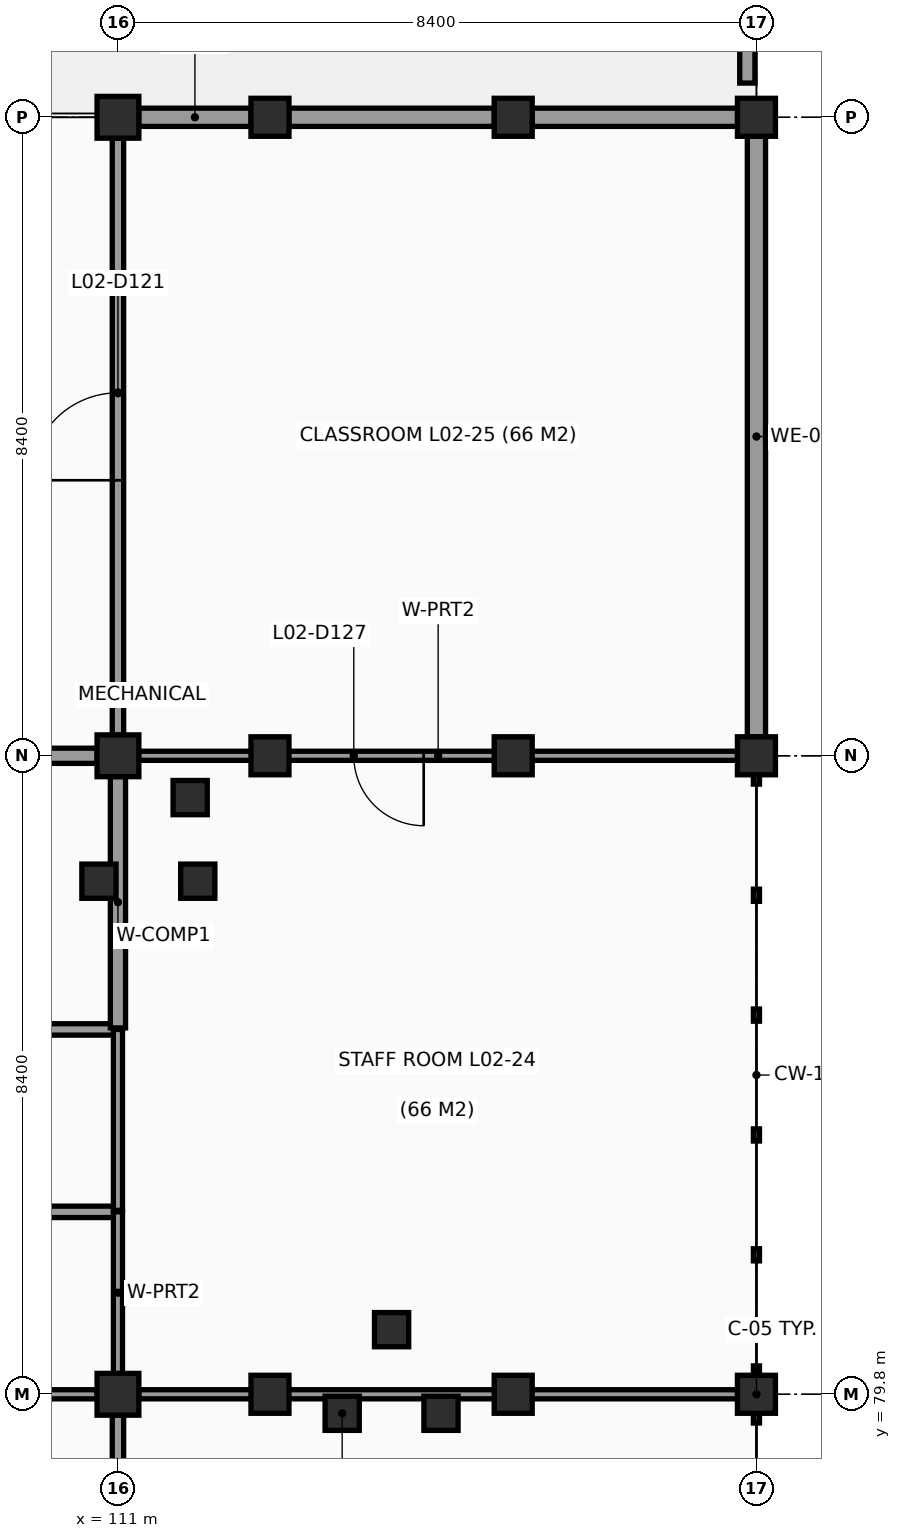
"""IFC4 building model, lengths in metres.
Left out: names, types, materials, properties, quantities, classifications, styles, units other than length and angle.
Written with IfcOpenShell. Run it as: python <this file> out.ifc"""

import sys

from ifc_helpers import new_model, si_unit, direction, frame, frame_2d, origin, origin_2d, place, context, subcontext, project, spatial, rectangle, extrude, element, fill, save


model = new_model("IFC4")
c1 = context("Model", 3, precision=1e-05, world=origin(), true_north=direction((0.0, 1.0)))
c2 = subcontext(c1, "Body", "Model", "MODEL_VIEW")
j1 = project(units=[si_unit("LENGTHUNIT", "METRE"), si_unit("PLANEANGLEUNIT", "RADIAN")], contexts=[c1])
p1 = place(None, origin())
s1 = spatial("IfcSite", under=j1, at=p1, CompositionType="ELEMENT")
p2 = place(p1, origin())
s2 = spatial("IfcBuilding", under=s1, at=p2, CompositionType="ELEMENT")
p3 = place(p2, frame((0.0, 0.0, 7.8)))
s3 = spatial("IfcBuildingStorey", under=s2, at=p3, CompositionType="ELEMENT", Elevation=7.8)
for number, where, z_axis, x_axis in (
    (1, (111.0, 79.8, 0.0), (0.0, 0.0, 1.0), (1.0, 0.0, 0.0)),
    (2, (111.0, 88.2, 0.0), (0.0, 0.0, 1.0), (1.0, 0.0, 0.0)),
    (3, (111.0, 96.6, 0.0), (0.0, 0.0, 1.0), (1.0, 0.0, 0.0)),
):
    element("IfcColumn", number, at=place(p3, frame(where, z_axis=z_axis, x_axis=x_axis)), inside=s3, PredefinedType="COLUMN", context=c2, shape_type="SweptSolid", body=[
        extrude(rectangle(XDim=0.55, YDim=0.55, at=origin_2d()), origin(), (0.0, 0.0, 1.0), 3.6),
    ])
for number, where, z_axis, x_axis in (
    (4, (119.4, 79.8, 0.0), (0.0, 0.0, 1.0), (1.0, 0.0, 0.0)),
    (5, (119.4, 88.2, 0.0), (0.0, 0.0, 1.0), (1.0, 0.0, 0.0)),
    (6, (119.4, 96.6, 0.0), (0.0, 0.0, 1.0), (1.0, 0.0, 0.0)),
):
    element("IfcColumn", number, at=place(p3, frame(where, z_axis=z_axis, x_axis=x_axis)), inside=s3, PredefinedType="COLUMN", context=c2, shape_type="SweptSolid", body=[
        extrude(rectangle(XDim=0.5, YDim=0.5, at=origin_2d()), origin(), (0.0, 0.0, 1.0), 3.34),
    ])
for number, where, z_axis, x_axis in (
    (7, (116.2, 79.8, 0.0), (0.0, 0.0, 1.0), (1.0, 0.0, 0.0)),
    (8, (116.2, 88.2, 0.0), (0.0, 0.0, 1.0), (1.0, 0.0, 0.0)),
    (9, (116.2, 96.6, 0.0), (0.0, 0.0, 1.0), (1.0, 0.0, 0.0)),
    (10, (113.0, 79.8, 0.0), (0.0, 0.0, 1.0), (1.0, 0.0, 0.0)),
    (11, (113.0, 88.2, 0.0), (0.0, 0.0, 1.0), (1.0, 0.0, 0.0)),
    (12, (113.0, 96.6, 0.0), (0.0, 0.0, 1.0), (1.0, 0.0, 0.0)),
):
    element("IfcColumn", number, at=place(p3, frame(where, z_axis=z_axis, x_axis=x_axis)), inside=s3, PredefinedType="COLUMN", context=c2, shape_type="SweptSolid", body=[
        extrude(rectangle(XDim=0.5, YDim=0.5, at=origin_2d()), origin(), (0.0, 0.0, 1.0), 3.6),
    ])
for number, where, z_axis, x_axis in (
    (13, (113.95, 79.55, 0.0), (0.0, 0.0, 1.0), (1.0, 0.0, 0.0)),
    (14, (115.25, 79.55, 0.0), (0.0, 0.0, 1.0), (1.0, 0.0, 0.0)),
    (15, (114.6, 80.65, 0.0), (0.0, 0.0, 1.0), (1.0, 0.0, 0.0)),
    (16, (110.75, 86.55, 0.0), (0.0, 0.0, 1.0), (1.0, 0.0, 0.0)),
    (17, (112.05, 86.55, 0.0), (0.0, 0.0, 1.0), (1.0, 0.0, 0.0)),
    (18, (111.95, 87.65, 0.0), (0.0, 0.0, 1.0), (1.0, 0.0, 0.0)),
):
    element("IfcColumn", number, at=place(p3, frame(where, z_axis=z_axis, x_axis=x_axis)), inside=s3, PredefinedType="COLUMN", context=c2, shape_type="SweptSolid", body=[
        extrude(rectangle(XDim=0.45, YDim=0.45, at=origin_2d()), origin(), (0.0, 0.0, 1.0), 3.6),
    ])
p4 = place(p3, frame((111.273, 96.6, 0.0), z_axis=(0.0, 0.0, 1.0), x_axis=(1.0, 0.0, 0.0)))
e19 = element("IfcWall", 19, at=p4, inside=s3, PredefinedType="SOLIDWALL", context=c2, shape_type="SweptSolid", body=[
    extrude(rectangle(XDim=1.479, YDim=0.24, at=frame_2d((0.74, 0.0))), origin(), (0.0, 0.0, 1.0), 2.58),
])
p5 = place(p3, frame((113.248, 96.6, 0.0), z_axis=(0.0, 0.0, 1.0), x_axis=(1.0, 0.0, 0.0)))
e20 = element("IfcWall", 20, at=p5, inside=s3, PredefinedType="SOLIDWALL", context=c2, shape_type="SweptSolid", body=[
    extrude(rectangle(XDim=2.704, YDim=0.24, at=frame_2d((1.352, 0.0))), origin(), (0.0, 0.0, 1.0), 2.58),
])
p6 = place(p3, frame((116.448, 96.6, 0.0), z_axis=(0.0, 0.0, 1.0), x_axis=(1.0, 0.0, 0.0)))
e21 = element("IfcWall", 21, at=p6, inside=s3, PredefinedType="SOLIDWALL", context=c2, shape_type="SweptSolid", body=[
    extrude(rectangle(XDim=2.704, YDim=0.24, at=frame_2d((1.352, 0.0))), origin(), (0.0, 0.0, 1.0), 2.58),
])
p7 = place(p3, frame((119.4, 96.352, 0.0), z_axis=(0.0, 0.0, 1.0), x_axis=(0.0, -1.0, 0.0)))
e22 = element("IfcWall", 22, at=p7, inside=s3, PredefinedType="SOLIDWALL", context=c2, shape_type="SweptSolid", body=[
    extrude(rectangle(XDim=7.904, YDim=0.24, at=frame_2d((3.952, 0.0))), origin(), (0.0, 0.0, 1.0), 2.58),
])
p8 = place(p3, frame((119.28, 111.88, 0.0), z_axis=(0.0, 0.0, 1.0), x_axis=(0.0, -1.0, 0.0)))
e23 = element("IfcWall", 23, at=p8, inside=s3, PredefinedType="PARAPET", context=c2, shape_type="SweptSolid", body=[
    extrude(rectangle(XDim=14.83, YDim=0.2, at=frame_2d((7.415, 0.0))), origin(), (0.0, 0.0, 1.0), 1.1),
])
p9 = place(p3, frame((110.727, 79.8, 0.0), z_axis=(0.0, 0.0, 1.0), x_axis=(-1.0, 0.0, 0.0)))
e24 = element("IfcWall", 24, at=p9, inside=s3, PredefinedType="PARTITIONING", context=c2, shape_type="SweptSolid", body=[
    extrude(rectangle(XDim=3.907, YDim=0.12, at=frame_2d((1.954, 0.0))), origin(), (0.0, 0.0, 1.0), 2.95),
])
p10 = place(p9, frame((2.154, 0.0, 0.0)))
e25 = element("IfcOpeningElement", 25, at=p10, cuts=e24, PredefinedType="OPENING", context=c2, shape_type="SweptSolid", body=[
    extrude(rectangle(XDim=0.9, YDim=2.1, at=frame_2d((0.45, 1.05))), frame((0.0, 0.07, 0.0), z_axis=(0.0, -1.0, 0.0), x_axis=(1.0, 0.0, 0.0)), (0.0, 0.0, 1.0), 0.14),
])
p11 = place(p3, frame((106.82, 82.2, 0.0), z_axis=(0.0, 0.0, 1.0), x_axis=(1.0, 0.0, 0.0)))
e26 = element("IfcWall", 26, at=p11, inside=s3, PredefinedType="PARTITIONING", context=c2, shape_type="SweptSolid", body=[
    extrude(rectangle(XDim=4.18, YDim=0.15, at=frame_2d((2.09, 0.0))), origin(), (0.0, 0.0, 1.0), 2.94),
])
p12 = place(p3, frame((111.0, 82.2, 0.0), z_axis=(0.0, 0.0, 1.0), x_axis=(0.0, -1.0, 0.0)))
e27 = element("IfcWall", 27, at=p12, inside=s3, PredefinedType="PARTITIONING", context=c2, shape_type="SweptSolid", body=[
    extrude(rectangle(XDim=2.127, YDim=0.12, at=frame_2d((1.063, 0.0))), origin(), (0.0, 0.0, 1.0), 2.94),
])
p13 = place(p3, frame((106.8, 84.6, 0.0), z_axis=(0.0, 0.0, 1.0), x_axis=(1.0, 0.0, 0.0)))
e28 = element("IfcWall", 28, at=p13, inside=s3, PredefinedType="PARTITIONING", context=c2, shape_type="SweptSolid", body=[
    extrude(rectangle(XDim=4.2, YDim=0.15, at=frame_2d((2.1, 0.0))), origin(), (0.0, 0.0, 1.0), 2.94),
])
p14 = place(p13, frame((1.5, 0.0, 0.0)))
e29 = element("IfcOpeningElement", 29, at=p14, cuts=e28, PredefinedType="OPENING", context=c2, shape_type="SweptSolid", body=[
    extrude(rectangle(XDim=1.2, YDim=2.15, at=frame_2d((0.6, 1.075))), frame((0.0, 0.085, 0.0), z_axis=(0.0, -1.0, 0.0), x_axis=(1.0, 0.0, 0.0)), (0.0, 0.0, 1.0), 0.17),
])
p15 = place(p3, frame((111.0, 84.6, 0.0), z_axis=(0.0, 0.0, 1.0), x_axis=(0.0, -1.0, 0.0)))
e30 = element("IfcWall", 30, at=p15, inside=s3, PredefinedType="PARTITIONING", context=c2, shape_type="SweptSolid", body=[
    extrude(rectangle(XDim=2.38, YDim=0.12, at=frame_2d((1.19, 0.0))), origin(), (0.0, 0.0, 1.0), 2.94),
])
p16 = place(p3, frame((106.82, 88.2, 0.0), z_axis=(0.0, 0.0, 1.0), x_axis=(1.0, 0.0, 0.0)))
e31 = element("IfcWall", 31, at=p16, inside=s3, PredefinedType="PARTITIONING", context=c2, shape_type="SweptSolid", body=[
    extrude(rectangle(XDim=3.907, YDim=0.2, at=frame_2d((1.954, 0.0))), origin(), (0.0, 0.0, 1.0), 2.59),
])
p17 = place(p16, frame((0.503, 0.0, 0.0)))
e32 = element("IfcOpeningElement", 32, at=p17, cuts=e31, PredefinedType="OPENING", context=c2, shape_type="SweptSolid", body=[
    extrude(rectangle(XDim=1.6, YDim=2.2, at=frame_2d((0.8, 1.1))), frame((0.0, 0.11, 0.0), z_axis=(0.0, -1.0, 0.0), x_axis=(1.0, 0.0, 0.0)), (0.0, 0.0, 1.0), 0.22),
])
p18 = place(p3, frame((111.0, 87.927, 0.0), z_axis=(0.0, 0.0, 1.0), x_axis=(0.0, -1.0, 0.0)))
e33 = element("IfcWall", 33, at=p18, inside=s3, PredefinedType="PARTITIONING", context=c2, shape_type="SweptSolid", body=[
    extrude(rectangle(XDim=3.307, YDim=0.2, at=frame_2d((1.653, 0.0))), origin(), (0.0, 0.0, 1.0), 2.94),
])
p19 = place(p3, frame((111.0, 79.527, 0.0), z_axis=(0.0, 0.0, 1.0), x_axis=(0.0, -1.0, 0.0)))
e34 = element("IfcWall", 34, at=p19, inside=s3, PredefinedType="PARTITIONING", context=c2, shape_type="SweptSolid", body=[
    extrude(rectangle(XDim=5.354, YDim=0.15, at=frame_2d((2.677, 0.0))), origin(), (0.0, 0.0, 1.0), 2.94),
])
p20 = place(p19, frame((2.227, 0.0, 0.0)))
e35 = element("IfcOpeningElement", 35, at=p20, cuts=e34, PredefinedType="OPENING", context=c2, shape_type="SweptSolid", body=[
    extrude(rectangle(XDim=0.9, YDim=2.05, at=frame_2d((0.45, 1.025))), frame((0.0, 0.085, 0.0), z_axis=(0.0, -1.0, 0.0), x_axis=(1.0, 0.0, 0.0)), (0.0, 0.0, 1.0), 0.17),
])
p21 = place(p3, frame((111.0, 96.327, 0.0), z_axis=(0.0, 0.0, 1.0), x_axis=(0.0, -1.0, 0.0)))
e36 = element("IfcWall", 36, at=p21, inside=s3, PredefinedType="PARTITIONING", context=c2, shape_type="SweptSolid", body=[
    extrude(rectangle(XDim=7.854, YDim=0.15, at=frame_2d((3.927, 0.0))), origin(), (0.0, 0.0, 1.0), 2.94),
])
p22 = place(p21, frame((3.352, 0.0, 0.0)))
e37 = element("IfcOpeningElement", 37, at=p22, cuts=e36, PredefinedType="OPENING", context=c2, shape_type="SweptSolid", body=[
    extrude(rectangle(XDim=1.15, YDim=2.15, at=frame_2d((0.575, 1.075))), frame((0.0, 0.085, 0.0), z_axis=(0.0, -1.0, 0.0), x_axis=(1.0, 0.0, 0.0)), (0.0, 0.0, 1.0), 0.17),
])
p23 = place(p3, frame((111.273, 79.8, 0.0), z_axis=(0.0, 0.0, 1.0), x_axis=(1.0, 0.0, 0.0)))
e38 = element("IfcWall", 38, at=p23, inside=s3, PredefinedType="PARTITIONING", context=c2, shape_type="SweptSolid", body=[
    extrude(rectangle(XDim=7.879, YDim=0.12, at=frame_2d((3.939, 0.0))), origin(), (0.0, 0.0, 1.0), 2.89),
])
p24 = place(p3, frame((111.273, 88.2, 0.0), z_axis=(0.0, 0.0, 1.0), x_axis=(1.0, 0.0, 0.0)))
e39 = element("IfcWall", 39, at=p24, inside=s3, PredefinedType="PARTITIONING", context=c2, shape_type="SweptSolid", body=[
    extrude(rectangle(XDim=7.879, YDim=0.12, at=frame_2d((3.939, 0.0))), origin(), (0.0, 0.0, 1.0), 2.53),
])
p25 = place(p24, frame((2.83, 0.0, 0.0)))
e40 = element("IfcOpeningElement", 40, at=p25, cuts=e39, PredefinedType="OPENING", context=c2, shape_type="SweptSolid", body=[
    extrude(rectangle(XDim=0.92, YDim=2.1, at=frame_2d((0.46, 1.05))), frame((0.0, 0.07, 0.0), z_axis=(0.0, -1.0, 0.0), x_axis=(1.0, 0.0, 0.0)), (0.0, 0.0, 1.0), 0.14),
])
p26 = place(p22, origin())
e41 = element("IfcDoor", 41, at=p26, inside=s3, OperationType="SINGLE_SWING_RIGHT", PredefinedType="DOOR", context=c2, shape_type="SweptSolid", body=[
    extrude(rectangle(XDim=1.15, YDim=2.15, at=frame_2d((0.575, 1.075))), frame((0.0, 0.025, 0.0), z_axis=(0.0, -1.0, 0.0), x_axis=(1.0, 0.0, 0.0)), (0.0, 0.0, 1.0), 0.05),
])
fill(e37, e41)
p27 = place(p25, origin())
e42 = element("IfcDoor", 42, at=p27, inside=s3, OperationType="SINGLE_SWING_RIGHT", PredefinedType="DOOR", context=c2, shape_type="SweptSolid", body=[
    extrude(rectangle(XDim=0.92, YDim=2.1, at=frame_2d((0.46, 1.05))), frame((0.0, 0.025, 0.0), z_axis=(0.0, -1.0, 0.0), x_axis=(1.0, 0.0, 0.0)), (0.0, 0.0, 1.0), 0.05),
])
fill(e40, e42)
save(model, sys.argv[1])
